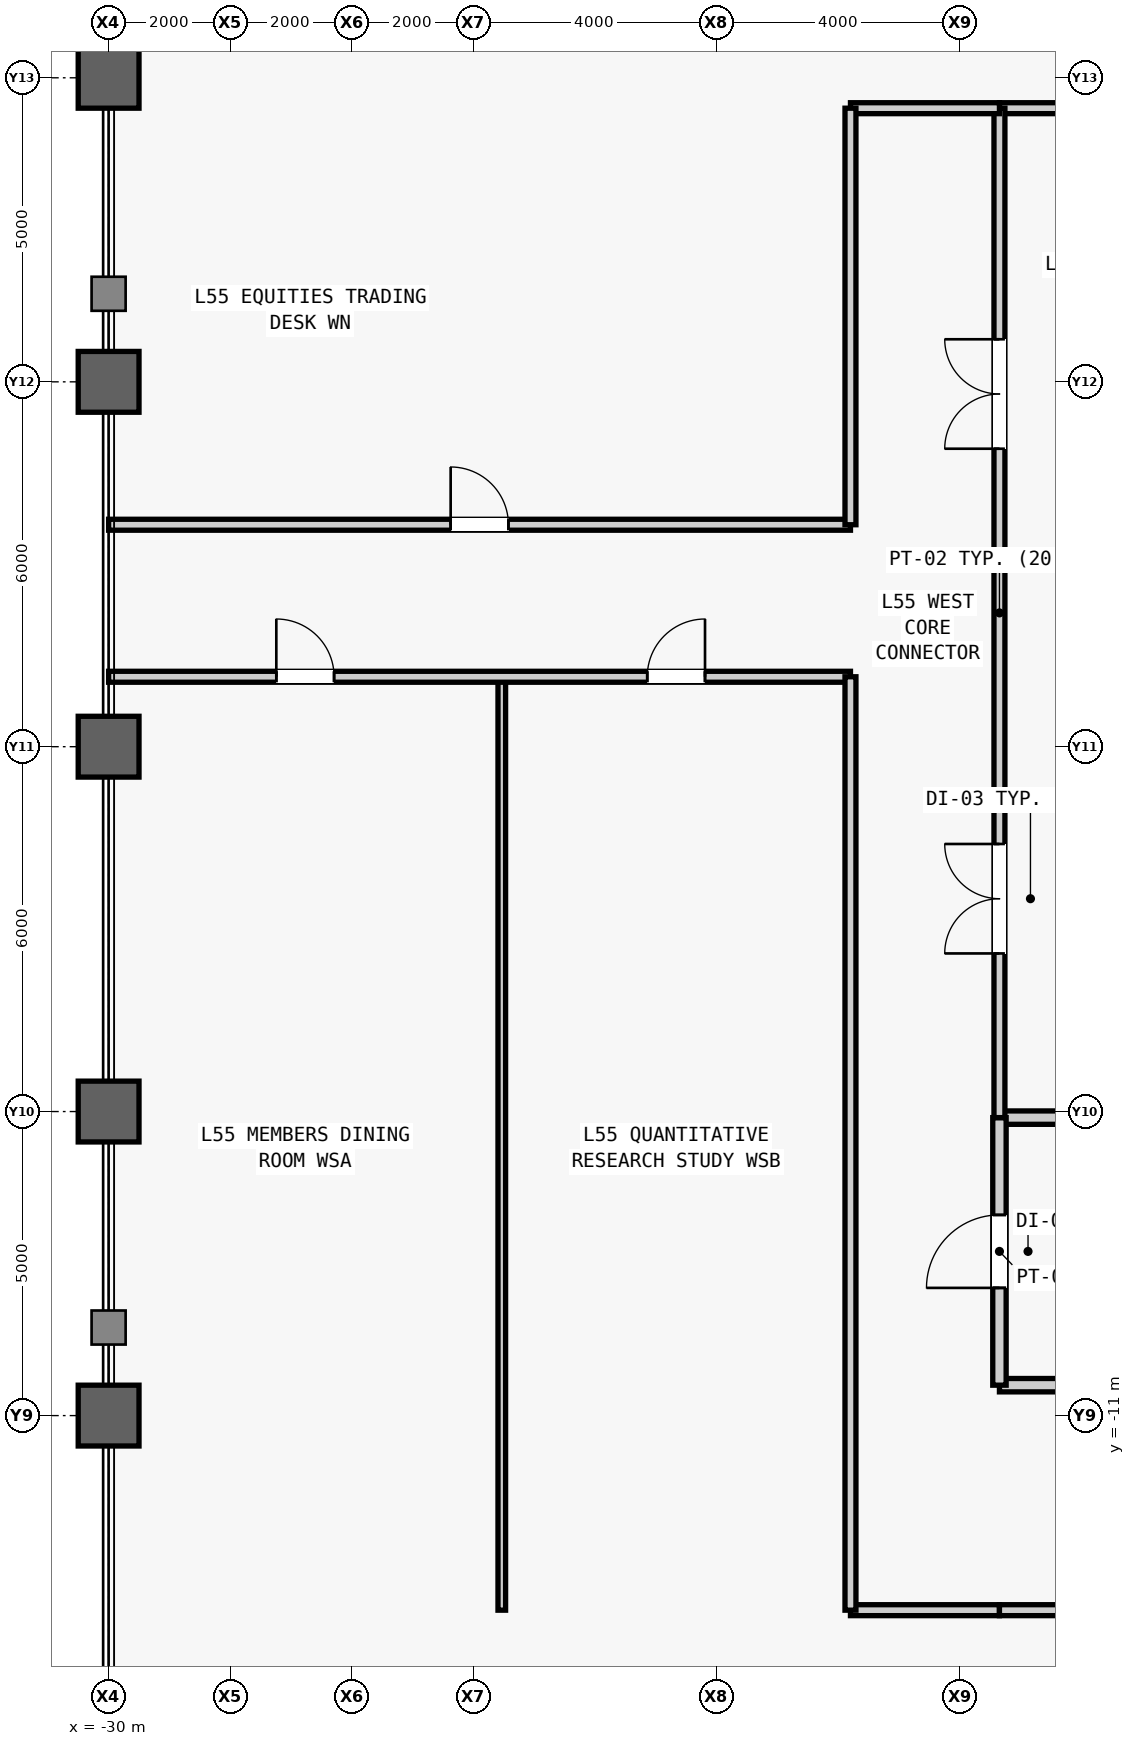
"""IFC4 building model, lengths in metres.
Left out: names, types, materials, properties, quantities, classifications, styles, units other than length and angle.
Written with IfcOpenShell. Run it as: python <this file> out.ifc"""

import sys

from ifc_helpers import new_model, si_unit, direction, frame, frame_2d, origin, origin_2d, place, context, subcontext, project, spatial, rectangle, hollow_rectangle, extrude, source, transform, mapped, element, fill, save


model = new_model("IFC4")
c1 = context("Model", 3, precision=1e-05, world=origin(), true_north=direction((0.0, 1.0)))
c2 = subcontext(c1, "Body", "Model", "MODEL_VIEW")
j1 = project(units=[si_unit("LENGTHUNIT", "METRE"), si_unit("PLANEANGLEUNIT", "RADIAN")], contexts=[c1])
p1 = place(None, origin())
s1 = spatial("IfcSite", under=j1, at=p1, CompositionType="ELEMENT")
p2 = place(p1, origin())
s2 = spatial("IfcBuilding", under=s1, at=p2, CompositionType="ELEMENT")
p3 = place(p2, frame((0.0, 0.0, 235.1)))
s3 = spatial("IfcBuildingStorey", under=s2, at=p3, CompositionType="ELEMENT", Elevation=235.1)
m1 = source(origin(), c2, "Body", "SweptSolid", [
    extrude(hollow_rectangle(XDim=1.0, YDim=1.0, WallThickness=0.055, at=origin_2d()), origin(), (0.0, 0.0, 1.0), 4.0),
])
for number, where, z_axis, x_axis in (
    (1, (-30.0, -11.0, 0.0), (0.0, 0.0, 1.0), (1.0, 0.0, 0.0)),
    (2, (-30.0, -6.0, 0.0), (0.0, 0.0, 1.0), (1.0, 0.0, 0.0)),
    (3, (-30.0, 0.0, 0.0), (0.0, 0.0, 1.0), (1.0, 0.0, 0.0)),
    (4, (-30.0, 6.0, 0.0), (0.0, 0.0, 1.0), (1.0, 0.0, 0.0)),
    (5, (-30.0, 11.0, 0.0), (0.0, 0.0, 1.0), (1.0, 0.0, 0.0)),
):
    element("IfcColumn", number, at=place(p3, frame(where, z_axis=z_axis, x_axis=x_axis)), inside=s3, PredefinedType="COLUMN", context=c2, shape_type="MappedRepresentation", body=[
        mapped(m1, transform((0.0, 0.0, 0.0), scale=1.0)),
    ])
m2 = source(origin(), c2, "Body", "SweptSolid", [
    extrude(rectangle(XDim=4.05, YDim=0.22, at=frame_2d((2.025, 0.0))), origin(), (0.0, 0.0, 1.0), 3.78),
])
p4 = place(p3, frame((-15.35, -10.5, 0.0), z_axis=(0.0, 0.0, 1.0), x_axis=(1.0, 0.0, 0.0)))
e6 = element("IfcWall", 6, at=p4, inside=s3, PredefinedType="PARTITIONING", context=c2, shape_type="MappedRepresentation", body=[
    mapped(m2, transform((0.0, 0.0, 0.0), scale=1.0)),
])
m3 = source(origin(), c2, "Body", "SweptSolid", [
    extrude(rectangle(XDim=4.05, YDim=0.22, at=frame_2d((2.025, 0.0))), origin(), (0.0, 0.0, 1.0), 3.085),
])
p5 = place(p3, frame((-15.35, -6.1, 0.0), z_axis=(0.0, 0.0, 1.0), x_axis=(1.0, 0.0, 0.0)))
e7 = element("IfcWall", 7, at=p5, inside=s3, PredefinedType="PARTITIONING", context=c2, shape_type="MappedRepresentation", body=[
    mapped(m3, transform((0.0, 0.0, 0.0), scale=1.0)),
])
m4 = source(origin(), c2, "Body", "SweptSolid", [
    extrude(rectangle(XDim=4.4, YDim=0.22, at=frame_2d((2.2, 0.0))), origin(), (0.0, 0.0, 1.0), 3.78),
])
p6 = place(p3, frame((-15.35, -10.5, 0.0), z_axis=(0.0, 0.0, 1.0), x_axis=(0.0, 1.0, 0.0)))
e8 = element("IfcWall", 8, at=p6, inside=s3, PredefinedType="PARTITIONING", context=c2, shape_type="MappedRepresentation", body=[
    mapped(m4, transform((0.0, 0.0, 0.0), scale=1.0)),
])
m5 = source(origin(), c2, "Body", "SweptSolid", [
    extrude(rectangle(XDim=1.2, YDim=2.2, at=frame_2d((0.6, 1.1))), frame((0.0, 0.12, 0.0), z_axis=(0.0, -1.0, 0.0), x_axis=(1.0, 0.0, 0.0)), (0.0, 0.0, 1.0), 0.24),
])
p7 = place(p6, frame((1.6, 0.0, 0.0)))
e9 = element("IfcOpeningElement", 9, at=p7, cuts=e8, PredefinedType="OPENING", context=c2, shape_type="MappedRepresentation", body=[
    mapped(m5, transform((0.0, 0.0, 0.0), scale=1.0)),
])
m6 = source(origin(), c2, "Body", "SweptSolid", [
    extrude(rectangle(XDim=4.05, YDim=0.18, at=frame_2d((2.025, 0.0))), origin(), (0.0, 0.0, 1.0), 3.78),
])
p8 = place(p3, frame((-15.35, 10.5, 0.0), z_axis=(0.0, 0.0, 1.0), x_axis=(1.0, 0.0, 0.0)))
e10 = element("IfcWall", 10, at=p8, inside=s3, PredefinedType="PARTITIONING", context=c2, shape_type="MappedRepresentation", body=[
    mapped(m6, transform((0.0, 0.0, 0.0), scale=1.0)),
])
m7 = source(origin(), c2, "Body", "SweptSolid", [
    extrude(rectangle(XDim=16.6, YDim=0.18, at=frame_2d((8.3, 0.0))), origin(), (0.0, 0.0, 1.0), 3.78),
])
p9 = place(p3, frame((-15.35, -6.1, 0.0), z_axis=(0.0, 0.0, 1.0), x_axis=(0.0, 1.0, 0.0)))
e11 = element("IfcWall", 11, at=p9, inside=s3, PredefinedType="PARTITIONING", context=c2, shape_type="MappedRepresentation", body=[
    mapped(m7, transform((0.0, 0.0, 0.0), scale=1.0)),
])
m8 = source(origin(), c2, "Body", "SweptSolid", [
    extrude(rectangle(XDim=1.8, YDim=2.25, at=frame_2d((0.9, 1.125))), frame((0.0, 0.1, 0.0), z_axis=(0.0, -1.0, 0.0), x_axis=(1.0, 0.0, 0.0)), (0.0, 0.0, 1.0), 0.2),
])
p10 = place(p9, frame((2.7, 0.0, 0.0)))
e12 = element("IfcOpeningElement", 12, at=p10, cuts=e11, PredefinedType="OPENING", context=c2, shape_type="MappedRepresentation", body=[
    mapped(m8, transform((0.0, 0.0, 0.0), scale=1.0)),
])
p11 = place(p9, frame((11.0, 0.0, 0.0)))
e13 = element("IfcOpeningElement", 13, at=p11, cuts=e11, PredefinedType="OPENING", context=c2, shape_type="MappedRepresentation", body=[
    mapped(m8, transform((0.0, 0.0, 0.0), scale=1.0)),
])
m9 = source(origin(), c2, "Body", "SweptSolid", [
    extrude(rectangle(XDim=2.45, YDim=0.18, at=frame_2d((1.225, 0.0))), origin(), (0.0, 0.0, 1.0), 3.78),
])
for number, where, z_axis, x_axis in (
    (14, (-17.8, 10.5, 0.0), (0.0, 0.0, 1.0), (1.0, 0.0, 0.0)),
    (15, (-17.8, -14.2, 0.0), (0.0, 0.0, 1.0), (1.0, 0.0, 0.0)),
):
    element("IfcWall", number, at=place(p3, frame(where, z_axis=z_axis, x_axis=x_axis)), inside=s3, PredefinedType="PARTITIONING", context=c2, shape_type="MappedRepresentation", body=[
        mapped(m9, transform((0.0, 0.0, 0.0), scale=1.0)),
    ])
m10 = source(origin(), c2, "Body", "SweptSolid", [
    extrude(rectangle(XDim=22.15, YDim=0.18, at=frame_2d((11.075, 0.0))), origin(), (0.0, 0.0, 1.0), 3.78),
])
p12 = place(p3, frame((-15.35, -14.2, 0.0), z_axis=(0.0, 0.0, 1.0), x_axis=(1.0, 0.0, 0.0)))
e16 = element("IfcWall", 16, at=p12, inside=s3, PredefinedType="PARTITIONING", context=c2, shape_type="MappedRepresentation", body=[
    mapped(m10, transform((0.0, 0.0, 0.0), scale=1.0)),
])
m11 = source(origin(), c2, "Body", "SweptSolid", [
    extrude(rectangle(XDim=15.35, YDim=0.125, at=frame_2d((7.675, 0.0))), origin(), (0.0, 0.0, 1.0), 3.78),
])
p13 = place(p3, frame((-23.534, -14.2, 0.0), z_axis=(0.0, 0.0, 1.0), x_axis=(0.0, 1.0, 0.0)))
e17 = element("IfcWall", 17, at=p13, inside=s3, PredefinedType="PARTITIONING", context=c2, shape_type="MappedRepresentation", body=[
    mapped(m11, transform((0.0, 0.0, 0.0), scale=1.0)),
])
m12 = source(origin(), c2, "Body", "SweptSolid", [
    extrude(rectangle(XDim=12.2, YDim=0.18, at=frame_2d((6.1, 0.0))), origin(), (0.0, 0.0, 1.0), 3.78),
])
p14 = place(p3, frame((-30.0, 1.15, 0.0), z_axis=(0.0, 0.0, 1.0), x_axis=(1.0, 0.0, 0.0)))
e18 = element("IfcWall", 18, at=p14, inside=s3, PredefinedType="PARTITIONING", context=c2, shape_type="MappedRepresentation", body=[
    mapped(m12, transform((0.0, 0.0, 0.0), scale=1.0)),
])
m13 = source(origin(), c2, "Body", "SweptSolid", [
    extrude(rectangle(XDim=0.95, YDim=2.15, at=frame_2d((0.475, 1.075))), frame((0.0, 0.1, 0.0), z_axis=(0.0, -1.0, 0.0), x_axis=(1.0, 0.0, 0.0)), (0.0, 0.0, 1.0), 0.2),
])
p15 = place(p14, frame((2.758, 0.0, 0.0)))
e19 = element("IfcOpeningElement", 19, at=p15, cuts=e18, PredefinedType="OPENING", context=c2, shape_type="MappedRepresentation", body=[
    mapped(m13, transform((0.0, 0.0, 0.0), scale=1.0)),
])
p16 = place(p14, frame((8.858, 0.0, 0.0)))
e20 = element("IfcOpeningElement", 20, at=p16, cuts=e18, PredefinedType="OPENING", context=c2, shape_type="MappedRepresentation", body=[
    mapped(m13, transform((0.0, 0.0, 0.0), scale=1.0)),
])
m14 = source(origin(), c2, "Body", "SweptSolid", [
    extrude(rectangle(XDim=15.35, YDim=0.18, at=frame_2d((7.675, 0.0))), origin(), (0.0, 0.0, 1.0), 3.78),
])
p17 = place(p3, frame((-17.8, -14.2, 0.0), z_axis=(0.0, 0.0, 1.0), x_axis=(0.0, 1.0, 0.0)))
e21 = element("IfcWall", 21, at=p17, inside=s3, PredefinedType="PARTITIONING", context=c2, shape_type="MappedRepresentation", body=[
    mapped(m14, transform((0.0, 0.0, 0.0), scale=1.0)),
])
p18 = place(p3, frame((-30.0, 3.65, 0.0), z_axis=(0.0, 0.0, 1.0), x_axis=(1.0, 0.0, 0.0)))
e22 = element("IfcWall", 22, at=p18, inside=s3, PredefinedType="PARTITIONING", context=c2, shape_type="MappedRepresentation", body=[
    mapped(m12, transform((0.0, 0.0, 0.0), scale=1.0)),
])
p19 = place(p18, frame((5.625, 0.0, 0.0)))
e23 = element("IfcOpeningElement", 23, at=p19, cuts=e22, PredefinedType="OPENING", context=c2, shape_type="MappedRepresentation", body=[
    mapped(m13, transform((0.0, 0.0, 0.0), scale=1.0)),
])
m15 = source(origin(), c2, "Body", "SweptSolid", [
    extrude(rectangle(XDim=6.85, YDim=0.18, at=frame_2d((3.425, 0.0))), origin(), (0.0, 0.0, 1.0), 3.78),
])
p20 = place(p3, frame((-17.8, 3.65, 0.0), z_axis=(0.0, 0.0, 1.0), x_axis=(0.0, 1.0, 0.0)))
e24 = element("IfcWall", 24, at=p20, inside=s3, PredefinedType="PARTITIONING", context=c2, shape_type="MappedRepresentation", body=[
    mapped(m15, transform((0.0, 0.0, 0.0), scale=1.0)),
])
m16 = source(origin(), c2, "Body", "SweptSolid", [
    extrude(rectangle(XDim=1.2, YDim=2.2, at=frame_2d((0.6, 1.1))), frame((0.0, 0.025, 0.0), z_axis=(0.0, -1.0, 0.0), x_axis=(1.0, 0.0, 0.0)), (0.0, 0.0, 1.0), 0.05),
])
p21 = place(p7, origin())
e25 = element("IfcDoor", 25, at=p21, inside=s3, OperationType="SINGLE_SWING_LEFT", PredefinedType="DOOR", context=c2, shape_type="MappedRepresentation", body=[
    mapped(m16, transform((0.0, 0.0, 0.0), scale=1.0)),
])
fill(e9, e25)
m17 = source(origin(), c2, "Body", "SweptSolid", [
    extrude(rectangle(XDim=1.8, YDim=2.25, at=frame_2d((0.9, 1.125))), frame((0.0, 0.025, 0.0), z_axis=(0.0, -1.0, 0.0), x_axis=(1.0, 0.0, 0.0)), (0.0, 0.0, 1.0), 0.05),
])
p22 = place(p10, origin())
e26 = element("IfcDoor", 26, at=p22, inside=s3, OperationType="SINGLE_SWING_LEFT", PredefinedType="DOOR", context=c2, shape_type="MappedRepresentation", body=[
    mapped(m17, transform((0.0, 0.0, 0.0), scale=1.0)),
])
fill(e12, e26)
p23 = place(p11, origin())
e27 = element("IfcDoor", 27, at=p23, inside=s3, OperationType="SINGLE_SWING_RIGHT", PredefinedType="DOOR", context=c2, shape_type="MappedRepresentation", body=[
    mapped(m17, transform((0.0, 0.0, 0.0), scale=1.0)),
])
fill(e13, e27)
m18 = source(origin(), c2, "Body", "SweptSolid", [
    extrude(rectangle(XDim=0.95, YDim=2.15, at=frame_2d((0.475, 1.075))), frame((0.0, 0.025, 0.0), z_axis=(0.0, -1.0, 0.0), x_axis=(1.0, 0.0, 0.0)), (0.0, 0.0, 1.0), 0.05),
])
p24 = place(p15, origin())
e28 = element("IfcDoor", 28, at=p24, inside=s3, OperationType="SINGLE_SWING_LEFT", PredefinedType="DOOR", context=c2, shape_type="MappedRepresentation", body=[
    mapped(m18, transform((0.0, 0.0, 0.0), scale=1.0)),
])
fill(e19, e28)
p25 = place(p16, origin())
e29 = element("IfcDoor", 29, at=p25, inside=s3, OperationType="SINGLE_SWING_RIGHT", PredefinedType="DOOR", context=c2, shape_type="MappedRepresentation", body=[
    mapped(m18, transform((0.0, 0.0, 0.0), scale=1.0)),
])
fill(e20, e29)
p26 = place(p19, origin())
e30 = element("IfcDoor", 30, at=p26, inside=s3, OperationType="SINGLE_SWING_LEFT", PredefinedType="DOOR", context=c2, shape_type="MappedRepresentation", body=[
    mapped(m18, transform((0.0, 0.0, 0.0), scale=1.0)),
])
fill(e23, e30)
save(model, sys.argv[1])
